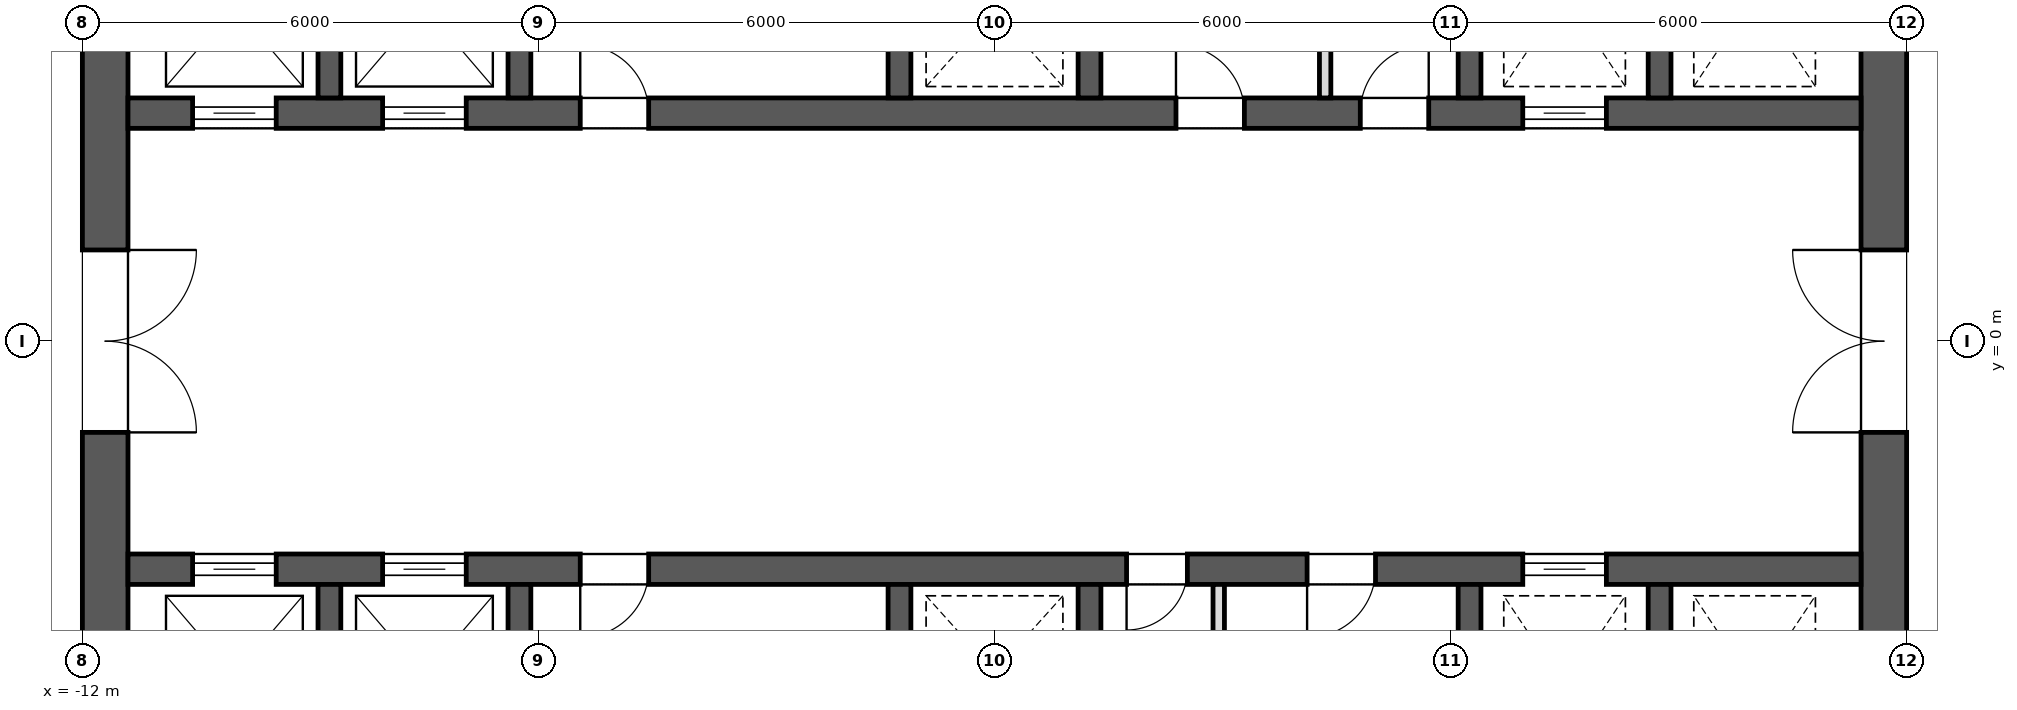
"""IFC4 building model, lengths in metres.
Left out: names, types, materials, properties, quantities, classifications, styles, units other than length and angle.
Written with IfcOpenShell. Run it as: python <this file> out.ifc"""

import sys

from ifc_helpers import new_model, si_unit, direction, frame, frame_2d, origin, place, context, subcontext, project, spatial, rectangle, extrude, element, fill, save


model = new_model("IFC4")
c1 = context("Model", 3, precision=1e-05, world=origin(), true_north=direction((0.0, 1.0)))
c2 = subcontext(c1, "Body", "Model", "MODEL_VIEW")
j1 = project(units=[si_unit("LENGTHUNIT", "METRE"), si_unit("PLANEANGLEUNIT", "RADIAN")], contexts=[c1])
p1 = place(None, origin())
s1 = spatial("IfcSite", under=j1, at=p1, CompositionType="ELEMENT")
p2 = place(p1, origin())
s2 = spatial("IfcBuilding", under=s1, at=p2, CompositionType="ELEMENT")
p3 = place(p2, frame((0.0, 0.0, 312.3)))
s3 = spatial("IfcBuildingStorey", under=s2, at=p3, CompositionType="ELEMENT", Elevation=312.3)
p4 = place(p3, frame((11.7, -11.4, 0.0), z_axis=(0.0, 0.0, 1.0), x_axis=(0.0, 1.0, 0.0)))
e1 = element("IfcWall", 1, at=p4, inside=s3, PredefinedType="SHEAR", context=c2, shape_type="SweptSolid", body=[
    extrude(rectangle(XDim=22.8, YDim=0.6, at=frame_2d((11.4, 0.0))), origin(), (0.0, 0.0, 1.0), 4.0),
])
p5 = place(p4, frame((10.2, 0.0, 0.0)))
e2 = element("IfcOpeningElement", 2, at=p5, cuts=e1, PredefinedType="OPENING", context=c2, shape_type="SweptSolid", body=[
    extrude(rectangle(XDim=2.4, YDim=2.1, at=frame_2d((1.2, 1.05))), frame((0.0, 0.312, 0.0), z_axis=(0.0, -1.0, 0.0), x_axis=(1.0, 0.0, 0.0)), (0.0, 0.0, 1.0), 0.624),
])
p6 = place(p4, frame((19.5, 0.0, 0.0)))
e3 = element("IfcOpeningElement", 3, at=p6, cuts=e1, PredefinedType="OPENING", context=c2, shape_type="SweptSolid", body=[
    extrude(rectangle(XDim=1.2, YDim=2.1, at=frame_2d((0.6, 1.05))), frame((0.0, 0.312, 0.0), z_axis=(0.0, -1.0, 0.0), x_axis=(1.0, 0.0, 0.0)), (0.0, 0.0, 1.0), 0.624),
])
p7 = place(p4, frame((2.1, 0.0, 0.0)))
e4 = element("IfcOpeningElement", 4, at=p7, cuts=e1, PredefinedType="OPENING", context=c2, shape_type="SweptSolid", body=[
    extrude(rectangle(XDim=1.2, YDim=2.1, at=frame_2d((0.6, 1.05))), frame((0.0, 0.312, 0.0), z_axis=(0.0, -1.0, 0.0), x_axis=(1.0, 0.0, 0.0)), (0.0, 0.0, 1.0), 0.624),
])
p8 = place(p3, frame((-11.7, -11.4, 0.0), z_axis=(0.0, 0.0, 1.0), x_axis=(0.0, 1.0, 0.0)))
e5 = element("IfcWall", 5, at=p8, inside=s3, PredefinedType="SHEAR", context=c2, shape_type="SweptSolid", body=[
    extrude(rectangle(XDim=22.8, YDim=0.6, at=frame_2d((11.4, 0.0))), origin(), (0.0, 0.0, 1.0), 4.0),
])
p9 = place(p8, frame((10.2, 0.0, 0.0)))
e6 = element("IfcOpeningElement", 6, at=p9, cuts=e5, PredefinedType="OPENING", context=c2, shape_type="SweptSolid", body=[
    extrude(rectangle(XDim=2.4, YDim=2.1, at=frame_2d((1.2, 1.05))), frame((0.0, 0.312, 0.0), z_axis=(0.0, -1.0, 0.0), x_axis=(1.0, 0.0, 0.0)), (0.0, 0.0, 1.0), 0.624),
])
p10 = place(p8, frame((18.925, 0.0, 0.0)))
e7 = element("IfcOpeningElement", 7, at=p10, cuts=e5, PredefinedType="OPENING", context=c2, shape_type="SweptSolid", body=[
    extrude(rectangle(XDim=1.2, YDim=2.1, at=frame_2d((0.6, 1.05))), frame((0.0, 0.312, 0.0), z_axis=(0.0, -1.0, 0.0), x_axis=(1.0, 0.0, 0.0)), (0.0, 0.0, 1.0), 0.624),
])
p11 = place(p8, frame((2.675, 0.0, 0.0)))
e8 = element("IfcOpeningElement", 8, at=p11, cuts=e5, PredefinedType="OPENING", context=c2, shape_type="SweptSolid", body=[
    extrude(rectangle(XDim=1.2, YDim=2.1, at=frame_2d((0.6, 1.05))), frame((0.0, 0.312, 0.0), z_axis=(0.0, -1.0, 0.0), x_axis=(1.0, 0.0, 0.0)), (0.0, 0.0, 1.0), 0.624),
])
p12 = place(p3, frame((-11.4, 3.0, 0.0), z_axis=(0.0, 0.0, 1.0), x_axis=(1.0, 0.0, 0.0)))
e9 = element("IfcWall", 9, at=p12, inside=s3, PredefinedType="SHEAR", context=c2, shape_type="SweptSolid", body=[
    extrude(rectangle(XDim=22.8, YDim=0.4, at=frame_2d((11.4, 0.0))), origin(), (0.0, 0.0, 1.0), 4.0),
])
p13 = place(p12, frame((0.85, 0.0, 0.0)))
e10 = element("IfcOpeningElement", 10, at=p13, cuts=e9, PredefinedType="OPENING", context=c2, shape_type="SweptSolid", body=[
    extrude(rectangle(XDim=1.1, YDim=2.1, at=frame_2d((0.55, 1.05))), frame((0.0, 0.212, 0.0), z_axis=(0.0, -1.0, 0.0), x_axis=(1.0, 0.0, 0.0)), (0.0, 0.0, 1.0), 0.424),
])
p14 = place(p12, frame((3.35, 0.0, 0.0)))
e11 = element("IfcOpeningElement", 11, at=p14, cuts=e9, PredefinedType="OPENING", context=c2, shape_type="SweptSolid", body=[
    extrude(rectangle(XDim=1.1, YDim=2.1, at=frame_2d((0.55, 1.05))), frame((0.0, 0.212, 0.0), z_axis=(0.0, -1.0, 0.0), x_axis=(1.0, 0.0, 0.0)), (0.0, 0.0, 1.0), 0.424),
])
p15 = place(p12, frame((18.35, 0.0, 0.0)))
e12 = element("IfcOpeningElement", 12, at=p15, cuts=e9, PredefinedType="OPENING", context=c2, shape_type="SweptSolid", body=[
    extrude(rectangle(XDim=1.1, YDim=2.1, at=frame_2d((0.55, 1.05))), frame((0.0, 0.212, 0.0), z_axis=(0.0, -1.0, 0.0), x_axis=(1.0, 0.0, 0.0)), (0.0, 0.0, 1.0), 0.424),
])
p16 = place(p12, frame((13.788, 0.0, 0.0)))
e13 = element("IfcOpeningElement", 13, at=p16, cuts=e9, PredefinedType="OPENING", context=c2, shape_type="SweptSolid", body=[
    extrude(rectangle(XDim=0.9, YDim=2.1, at=frame_2d((0.45, 1.05))), frame((0.0, 0.212, 0.0), z_axis=(0.0, -1.0, 0.0), x_axis=(1.0, 0.0, 0.0)), (0.0, 0.0, 1.0), 0.424),
])
p17 = place(p12, frame((16.212, 0.0, 0.0)))
e14 = element("IfcOpeningElement", 14, at=p17, cuts=e9, PredefinedType="OPENING", context=c2, shape_type="SweptSolid", body=[
    extrude(rectangle(XDim=0.9, YDim=2.1, at=frame_2d((0.45, 1.05))), frame((0.0, 0.212, 0.0), z_axis=(0.0, -1.0, 0.0), x_axis=(1.0, 0.0, 0.0)), (0.0, 0.0, 1.0), 0.424),
])
p18 = place(p12, frame((5.95, 0.0, 0.0)))
e15 = element("IfcOpeningElement", 15, at=p18, cuts=e9, PredefinedType="OPENING", context=c2, shape_type="SweptSolid", body=[
    extrude(rectangle(XDim=0.9, YDim=2.1, at=frame_2d((0.45, 1.05))), frame((0.0, 0.212, 0.0), z_axis=(0.0, -1.0, 0.0), x_axis=(1.0, 0.0, 0.0)), (0.0, 0.0, 1.0), 0.424),
])
for number, where, z_axis, x_axis in (
    (16, (-8.75, 3.2, 0.0), (0.0, 0.0, 1.0), (0.0, 1.0, 0.0)),
    (17, (-6.25, 3.2, 0.0), (0.0, 0.0, 1.0), (0.0, 1.0, 0.0)),
    (18, (-1.25, 3.2, 0.0), (0.0, 0.0, 1.0), (0.0, 1.0, 0.0)),
    (19, (1.25, 3.2, 0.0), (0.0, 0.0, 1.0), (0.0, 1.0, 0.0)),
    (20, (6.25, 3.2, 0.0), (0.0, 0.0, 1.0), (0.0, 1.0, 0.0)),
    (21, (8.75, 3.2, 0.0), (0.0, 0.0, 1.0), (0.0, 1.0, 0.0)),
):
    element("IfcWall", number, at=place(p3, frame(where, z_axis=z_axis, x_axis=x_axis)), inside=s3, PredefinedType="SHEAR", context=c2, shape_type="SweptSolid", body=[
        extrude(rectangle(XDim=2.9, YDim=0.3, at=frame_2d((1.45, 0.0))), origin(), (0.0, 0.0, 1.0), 4.0),
    ])
p19 = place(p3, frame((-11.4, -3.0, 0.0), z_axis=(0.0, 0.0, 1.0), x_axis=(1.0, 0.0, 0.0)))
e22 = element("IfcWall", 22, at=p19, inside=s3, PredefinedType="SHEAR", context=c2, shape_type="SweptSolid", body=[
    extrude(rectangle(XDim=22.8, YDim=0.4, at=frame_2d((11.4, 0.0))), origin(), (0.0, 0.0, 1.0), 4.0),
])
p20 = place(p19, frame((0.85, 0.0, 0.0)))
e23 = element("IfcOpeningElement", 23, at=p20, cuts=e22, PredefinedType="OPENING", context=c2, shape_type="SweptSolid", body=[
    extrude(rectangle(XDim=1.1, YDim=2.1, at=frame_2d((0.55, 1.05))), frame((0.0, 0.212, 0.0), z_axis=(0.0, -1.0, 0.0), x_axis=(1.0, 0.0, 0.0)), (0.0, 0.0, 1.0), 0.424),
])
p21 = place(p19, frame((3.35, 0.0, 0.0)))
e24 = element("IfcOpeningElement", 24, at=p21, cuts=e22, PredefinedType="OPENING", context=c2, shape_type="SweptSolid", body=[
    extrude(rectangle(XDim=1.1, YDim=2.1, at=frame_2d((0.55, 1.05))), frame((0.0, 0.212, 0.0), z_axis=(0.0, -1.0, 0.0), x_axis=(1.0, 0.0, 0.0)), (0.0, 0.0, 1.0), 0.424),
])
p22 = place(p19, frame((18.35, 0.0, 0.0)))
e25 = element("IfcOpeningElement", 25, at=p22, cuts=e22, PredefinedType="OPENING", context=c2, shape_type="SweptSolid", body=[
    extrude(rectangle(XDim=1.1, YDim=2.1, at=frame_2d((0.55, 1.05))), frame((0.0, 0.212, 0.0), z_axis=(0.0, -1.0, 0.0), x_axis=(1.0, 0.0, 0.0)), (0.0, 0.0, 1.0), 0.424),
])
p23 = place(p19, frame((13.137, 0.0, 0.0)))
e26 = element("IfcOpeningElement", 26, at=p23, cuts=e22, PredefinedType="OPENING", context=c2, shape_type="SweptSolid", body=[
    extrude(rectangle(XDim=0.8, YDim=2.1, at=frame_2d((0.4, 1.05))), frame((0.0, 0.212, 0.0), z_axis=(0.0, -1.0, 0.0), x_axis=(1.0, 0.0, 0.0)), (0.0, 0.0, 1.0), 0.424),
])
p24 = place(p19, frame((15.512, 0.0, 0.0)))
e27 = element("IfcOpeningElement", 27, at=p24, cuts=e22, PredefinedType="OPENING", context=c2, shape_type="SweptSolid", body=[
    extrude(rectangle(XDim=0.9, YDim=2.1, at=frame_2d((0.45, 1.05))), frame((0.0, 0.212, 0.0), z_axis=(0.0, -1.0, 0.0), x_axis=(1.0, 0.0, 0.0)), (0.0, 0.0, 1.0), 0.424),
])
p25 = place(p19, frame((5.95, 0.0, 0.0)))
e28 = element("IfcOpeningElement", 28, at=p25, cuts=e22, PredefinedType="OPENING", context=c2, shape_type="SweptSolid", body=[
    extrude(rectangle(XDim=0.9, YDim=2.1, at=frame_2d((0.45, 1.05))), frame((0.0, 0.212, 0.0), z_axis=(0.0, -1.0, 0.0), x_axis=(1.0, 0.0, 0.0)), (0.0, 0.0, 1.0), 0.424),
])
for number, where, z_axis, x_axis in (
    (29, (-8.75, -6.1, 0.0), (0.0, 0.0, 1.0), (0.0, 1.0, 0.0)),
    (30, (-6.25, -6.1, 0.0), (0.0, 0.0, 1.0), (0.0, 1.0, 0.0)),
    (31, (-1.25, -6.1, 0.0), (0.0, 0.0, 1.0), (0.0, 1.0, 0.0)),
    (32, (1.25, -6.1, 0.0), (0.0, 0.0, 1.0), (0.0, 1.0, 0.0)),
    (33, (6.25, -6.1, 0.0), (0.0, 0.0, 1.0), (0.0, 1.0, 0.0)),
    (34, (8.75, -6.1, 0.0), (0.0, 0.0, 1.0), (0.0, 1.0, 0.0)),
):
    element("IfcWall", number, at=place(p3, frame(where, z_axis=z_axis, x_axis=x_axis)), inside=s3, PredefinedType="SHEAR", context=c2, shape_type="SweptSolid", body=[
        extrude(rectangle(XDim=2.9, YDim=0.3, at=frame_2d((1.45, 0.0))), origin(), (0.0, 0.0, 1.0), 4.0),
    ])
for number, where, z_axis, x_axis in (
    (35, (4.35, 3.2, 0.0), (0.0, 0.0, 1.0), (0.0, 1.0, 0.0)),
    (36, (2.95, -6.1, 0.0), (0.0, 0.0, 1.0), (0.0, 1.0, 0.0)),
):
    element("IfcWall", number, at=place(p3, frame(where, z_axis=z_axis, x_axis=x_axis)), inside=s3, PredefinedType="PARTITIONING", context=c2, shape_type="SweptSolid", body=[
        extrude(rectangle(XDim=2.9, YDim=0.15, at=frame_2d((1.45, 0.0))), origin(), (0.0, 0.0, 1.0), 3.7),
    ])
p26 = place(p13, origin())
e37 = element("IfcDoor", 37, at=p26, inside=s3, OperationType="SLIDING_TO_LEFT", PredefinedType="DOOR", context=c2, shape_type="SweptSolid", body=[
    extrude(rectangle(XDim=1.1, YDim=2.1, at=frame_2d((0.55, 1.05))), frame((0.0, 0.025, 0.0), z_axis=(0.0, -1.0, 0.0), x_axis=(1.0, 0.0, 0.0)), (0.0, 0.0, 1.0), 0.05),
])
fill(e10, e37)
p27 = place(p14, origin())
e38 = element("IfcDoor", 38, at=p27, inside=s3, OperationType="SLIDING_TO_LEFT", PredefinedType="DOOR", context=c2, shape_type="SweptSolid", body=[
    extrude(rectangle(XDim=1.1, YDim=2.1, at=frame_2d((0.55, 1.05))), frame((0.0, 0.025, 0.0), z_axis=(0.0, -1.0, 0.0), x_axis=(1.0, 0.0, 0.0)), (0.0, 0.0, 1.0), 0.05),
])
fill(e11, e38)
p28 = place(p20, origin())
e39 = element("IfcDoor", 39, at=p28, inside=s3, OperationType="SLIDING_TO_LEFT", PredefinedType="DOOR", context=c2, shape_type="SweptSolid", body=[
    extrude(rectangle(XDim=1.1, YDim=2.1, at=frame_2d((0.55, 1.05))), frame((0.0, 0.025, 0.0), z_axis=(0.0, -1.0, 0.0), x_axis=(1.0, 0.0, 0.0)), (0.0, 0.0, 1.0), 0.05),
])
fill(e23, e39)
p29 = place(p21, origin())
e40 = element("IfcDoor", 40, at=p29, inside=s3, OperationType="SLIDING_TO_LEFT", PredefinedType="DOOR", context=c2, shape_type="SweptSolid", body=[
    extrude(rectangle(XDim=1.1, YDim=2.1, at=frame_2d((0.55, 1.05))), frame((0.0, 0.025, 0.0), z_axis=(0.0, -1.0, 0.0), x_axis=(1.0, 0.0, 0.0)), (0.0, 0.0, 1.0), 0.05),
])
fill(e24, e40)
p30 = place(p15, origin())
e41 = element("IfcDoor", 41, at=p30, inside=s3, OperationType="SLIDING_TO_LEFT", PredefinedType="DOOR", context=c2, shape_type="SweptSolid", body=[
    extrude(rectangle(XDim=1.1, YDim=2.1, at=frame_2d((0.55, 1.05))), frame((0.0, 0.025, 0.0), z_axis=(0.0, -1.0, 0.0), x_axis=(1.0, 0.0, 0.0)), (0.0, 0.0, 1.0), 0.05),
])
fill(e12, e41)
p31 = place(p22, origin())
e42 = element("IfcDoor", 42, at=p31, inside=s3, OperationType="SLIDING_TO_LEFT", PredefinedType="DOOR", context=c2, shape_type="SweptSolid", body=[
    extrude(rectangle(XDim=1.1, YDim=2.1, at=frame_2d((0.55, 1.05))), frame((0.0, 0.025, 0.0), z_axis=(0.0, -1.0, 0.0), x_axis=(1.0, 0.0, 0.0)), (0.0, 0.0, 1.0), 0.05),
])
fill(e25, e42)
p32 = place(p9, frame((2.4, 0.0, 0.0), z_axis=(0.0, 0.0, 1.0), x_axis=(-1.0, 0.0, 0.0)))
e43 = element("IfcDoor", 43, at=p32, inside=s3, OperationType="DOUBLE_DOOR_SINGLE_SWING", PredefinedType="DOOR", context=c2, shape_type="SweptSolid", body=[
    extrude(rectangle(XDim=2.4, YDim=2.1, at=frame_2d((1.2, 1.05))), frame((0.0, 0.025, 0.0), z_axis=(0.0, -1.0, 0.0), x_axis=(1.0, 0.0, 0.0)), (0.0, 0.0, 1.0), 0.05),
])
fill(e6, e43)
p33 = place(p5, origin())
e44 = element("IfcDoor", 44, at=p33, inside=s3, OperationType="DOUBLE_DOOR_SINGLE_SWING", PredefinedType="DOOR", context=c2, shape_type="SweptSolid", body=[
    extrude(rectangle(XDim=2.4, YDim=2.1, at=frame_2d((1.2, 1.05))), frame((0.0, 0.025, 0.0), z_axis=(0.0, -1.0, 0.0), x_axis=(1.0, 0.0, 0.0)), (0.0, 0.0, 1.0), 0.05),
])
fill(e2, e44)
p34 = place(p16, origin())
e45 = element("IfcDoor", 45, at=p34, inside=s3, OperationType="SINGLE_SWING_RIGHT", PredefinedType="DOOR", context=c2, shape_type="SweptSolid", body=[
    extrude(rectangle(XDim=0.9, YDim=2.1, at=frame_2d((0.45, 1.05))), frame((0.0, 0.025, 0.0), z_axis=(0.0, -1.0, 0.0), x_axis=(1.0, 0.0, 0.0)), (0.0, 0.0, 1.0), 0.05),
])
fill(e13, e45)
p35 = place(p17, origin())
e46 = element("IfcDoor", 46, at=p35, inside=s3, OperationType="SINGLE_SWING_LEFT", PredefinedType="DOOR", context=c2, shape_type="SweptSolid", body=[
    extrude(rectangle(XDim=0.9, YDim=2.1, at=frame_2d((0.45, 1.05))), frame((0.0, 0.025, 0.0), z_axis=(0.0, -1.0, 0.0), x_axis=(1.0, 0.0, 0.0)), (0.0, 0.0, 1.0), 0.05),
])
fill(e14, e46)
p36 = place(p18, origin())
e47 = element("IfcDoor", 47, at=p36, inside=s3, OperationType="SINGLE_SWING_RIGHT", PredefinedType="DOOR", context=c2, shape_type="SweptSolid", body=[
    extrude(rectangle(XDim=0.9, YDim=2.1, at=frame_2d((0.45, 1.05))), frame((0.0, 0.025, 0.0), z_axis=(0.0, -1.0, 0.0), x_axis=(1.0, 0.0, 0.0)), (0.0, 0.0, 1.0), 0.05),
])
fill(e15, e47)
p37 = place(p23, frame((0.8, 0.0, 0.0), z_axis=(0.0, 0.0, 1.0), x_axis=(-1.0, 0.0, 0.0)))
e48 = element("IfcDoor", 48, at=p37, inside=s3, OperationType="SINGLE_SWING_LEFT", PredefinedType="DOOR", context=c2, shape_type="SweptSolid", body=[
    extrude(rectangle(XDim=0.8, YDim=2.1, at=frame_2d((0.4, 1.05))), frame((0.0, 0.025, 0.0), z_axis=(0.0, -1.0, 0.0), x_axis=(1.0, 0.0, 0.0)), (0.0, 0.0, 1.0), 0.05),
])
fill(e26, e48)
p38 = place(p24, frame((0.9, 0.0, 0.0), z_axis=(0.0, 0.0, 1.0), x_axis=(-1.0, 0.0, 0.0)))
e49 = element("IfcDoor", 49, at=p38, inside=s3, OperationType="SINGLE_SWING_LEFT", PredefinedType="DOOR", context=c2, shape_type="SweptSolid", body=[
    extrude(rectangle(XDim=0.9, YDim=2.1, at=frame_2d((0.45, 1.05))), frame((0.0, 0.025, 0.0), z_axis=(0.0, -1.0, 0.0), x_axis=(1.0, 0.0, 0.0)), (0.0, 0.0, 1.0), 0.05),
])
fill(e27, e49)
p39 = place(p25, frame((0.9, 0.0, 0.0), z_axis=(0.0, 0.0, 1.0), x_axis=(-1.0, 0.0, 0.0)))
e50 = element("IfcDoor", 50, at=p39, inside=s3, OperationType="SINGLE_SWING_LEFT", PredefinedType="DOOR", context=c2, shape_type="SweptSolid", body=[
    extrude(rectangle(XDim=0.9, YDim=2.1, at=frame_2d((0.45, 1.05))), frame((0.0, 0.025, 0.0), z_axis=(0.0, -1.0, 0.0), x_axis=(1.0, 0.0, 0.0)), (0.0, 0.0, 1.0), 0.05),
])
fill(e28, e50)
save(model, sys.argv[1])
